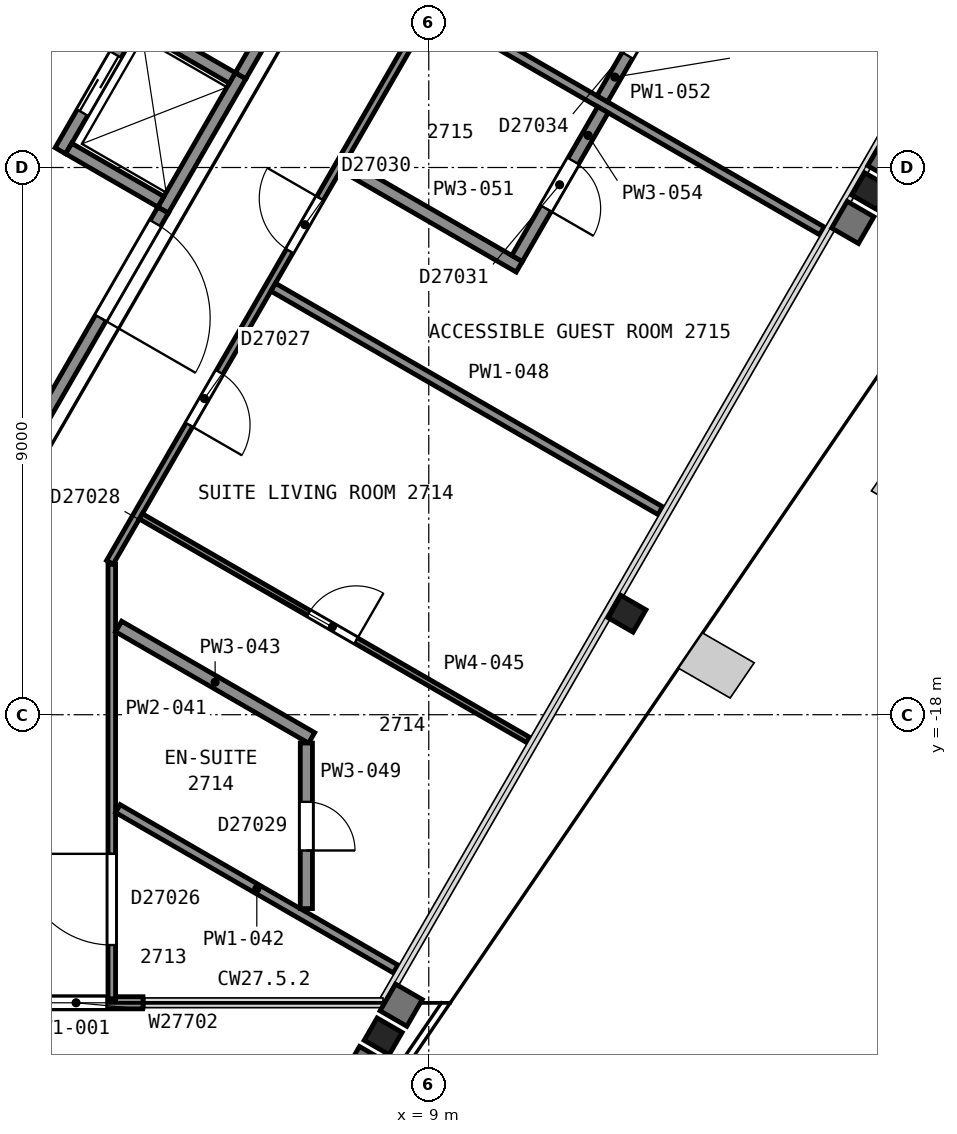
"""IFC4 building model, lengths in metres.
Left out: names, types, materials, properties, quantities, classifications, styles, units other than length and angle.
Written with IfcOpenShell. Run it as: python <this file> out.ifc"""

import sys

from ifc_helpers import new_model, si_unit, direction, frame, frame_2d, origin, origin_2d, place, context, subcontext, project, spatial, rectangle, i_section, extrude, element, fill, save


model = new_model("IFC4")
c1 = context("Model", 3, precision=1e-05, world=origin(), true_north=direction((0.0, 1.0)))
c2 = subcontext(c1, "Body", "Model", "MODEL_VIEW")
j1 = project(units=[si_unit("LENGTHUNIT", "METRE"), si_unit("PLANEANGLEUNIT", "RADIAN")], contexts=[c1])
p1 = place(None, origin())
s1 = spatial("IfcSite", under=j1, at=p1, CompositionType="ELEMENT")
p2 = place(p1, origin())
s2 = spatial("IfcBuilding", under=s1, at=p2, CompositionType="ELEMENT")
p3 = place(p2, frame((0.0, 0.0, 114.4)))
s3 = spatial("IfcBuildingStorey", under=s2, at=p3, CompositionType="ELEMENT", Elevation=114.4)
p4 = place(p3, frame((8.25, -23.29, 0.0), z_axis=(0.0, 0.0, 1.0), x_axis=(-0.5, -0.866025403784, 0.0)))
e1 = element("IfcColumn", 1, at=p4, inside=s3, PredefinedType="COLUMN", context=c2, shape_type="SweptSolid", body=[
    extrude(i_section(OverallWidth=0.424, OverallDepth=0.475, WebThickness=0.048, FlangeThickness=0.077, FilletRadius=0.015, at=origin_2d()), origin(), (0.0, 0.0, 1.0), 3.555),
])
p5 = place(p3, frame((12.26, -16.34, 0.0), z_axis=(0.0, 0.0, 1.0), x_axis=(-0.5, -0.866025403784, 0.0)))
e2 = element("IfcColumn", 2, at=p5, inside=s3, PredefinedType="COLUMN", context=c2, shape_type="SweptSolid", body=[
    extrude(i_section(OverallWidth=0.424, OverallDepth=0.475, WebThickness=0.048, FlangeThickness=0.077, FilletRadius=0.015, at=origin_2d()), origin(), (0.0, 0.0, 1.0), 3.56),
])
p6 = place(p3, frame((16.27, -9.39, 0.0), z_axis=(0.0, 0.0, 1.0), x_axis=(-0.5, -0.866025403784, 0.0)))
e3 = element("IfcColumn", 3, at=p6, inside=s3, PredefinedType="COLUMN", context=c2, shape_type="SweptSolid", body=[
    extrude(i_section(OverallWidth=0.424, OverallDepth=0.475, WebThickness=0.048, FlangeThickness=0.077, FilletRadius=0.015, at=origin_2d()), origin(), (0.0, 0.0, 1.0), 3.565),
])
p7 = place(p3, frame((-4.3, -22.738, 0.0), z_axis=(0.0, 0.0, 1.0), x_axis=(1.0, 0.0, 0.0)))
e4 = element("IfcWall", 4, at=p7, inside=s3, PredefinedType="SOLIDWALL", context=c2, shape_type="SweptSolid", body=[
    extrude(rectangle(XDim=8.6, YDim=0.2, at=frame_2d((4.3, 0.0))), origin(), (0.0, 0.0, 1.0), 2.613),
])
p8 = place(p7, frame((0.6, 0.0, 0.9)))
e5 = element("IfcOpeningElement", 5, at=p8, cuts=e4, PredefinedType="OPENING", context=c2, shape_type="SweptSolid", body=[
    extrude(rectangle(XDim=1.0, YDim=1.5, at=frame_2d((0.5, 0.75))), frame((0.0, 0.11, 0.0), z_axis=(0.0, -1.0, 0.0), x_axis=(1.0, 0.0, 0.0)), (0.0, 0.0, 1.0), 0.22),
])
p9 = place(p7, frame((2.2, 0.0, 0.0)))
e6 = element("IfcOpeningElement", 6, at=p9, cuts=e4, PredefinedType="OPENING", context=c2, shape_type="SweptSolid", body=[
    extrude(rectangle(XDim=1.8, YDim=2.4, at=frame_2d((0.9, 1.2))), frame((0.0, 0.11, 0.0), z_axis=(0.0, -1.0, 0.0), x_axis=(1.0, 0.0, 0.0)), (0.0, 0.0, 1.0), 0.22),
])
p10 = place(p7, frame((4.6, 0.0, 0.0)))
e7 = element("IfcOpeningElement", 7, at=p10, cuts=e4, PredefinedType="OPENING", context=c2, shape_type="SweptSolid", body=[
    extrude(rectangle(XDim=1.8, YDim=2.4, at=frame_2d((0.9, 1.2))), frame((0.0, 0.11, 0.0), z_axis=(0.0, -1.0, 0.0), x_axis=(1.0, 0.0, 0.0)), (0.0, 0.0, 1.0), 0.22),
])
p11 = place(p7, frame((7.0, 0.0, 0.9)))
e8 = element("IfcOpeningElement", 8, at=p11, cuts=e4, PredefinedType="OPENING", context=c2, shape_type="SweptSolid", body=[
    extrude(rectangle(XDim=1.0, YDim=1.5, at=frame_2d((0.5, 0.75))), frame((0.0, 0.11, 0.0), z_axis=(0.0, -1.0, 0.0), x_axis=(1.0, 0.0, 0.0)), (0.0, 0.0, 1.0), 0.22),
])
p12 = place(p3, frame((4.63, -9.7, 0.0), z_axis=(0.0, 0.0, 1.0), x_axis=(0.500062241894, 0.865989465428, 0.0)))
e9 = element("IfcWall", 9, at=p12, inside=s3, PredefinedType="PARTITIONING", context=c2, shape_type="SweptSolid", body=[
    extrude(rectangle(XDim=2.55, YDim=0.2, at=frame_2d((1.275, 0.0))), origin(), (0.0, 0.0, 1.0), 3.6),
])
p13 = place(p3, frame((2.942, -8.725, 0.0), z_axis=(0.0, 0.0, 1.0), x_axis=(0.500020783669, 0.866013403995, 0.0)))
e10 = element("IfcWall", 10, at=p13, inside=s3, PredefinedType="PARTITIONING", context=c2, shape_type="SweptSolid", body=[
    extrude(rectangle(XDim=2.55, YDim=0.2, at=frame_2d((1.275, 0.0))), origin(), (0.0, 0.0, 1.0), 3.6),
])
p14 = place(p13, frame((0.725, 0.0, 0.0)))
e11 = element("IfcOpeningElement", 11, at=p14, cuts=e10, PredefinedType="OPENING", context=c2, shape_type="SweptSolid", body=[
    extrude(rectangle(XDim=1.1, YDim=2.1, at=frame_2d((0.55, 1.05))), frame((0.0, 0.11, 0.0), z_axis=(0.0, -1.0, 0.0), x_axis=(1.0, 0.0, 0.0)), (0.0, 0.0, 1.0), 0.22),
])
p15 = place(p3, frame((5.769, -7.528, 0.0), z_axis=(0.0, 0.0, 1.0), x_axis=(-0.866002029911, 0.500040482552, 0.0)))
e12 = element("IfcWall", 12, at=p15, inside=s3, PredefinedType="PARTITIONING", context=c2, shape_type="SweptSolid", body=[
    extrude(rectangle(XDim=1.75, YDim=0.2, at=frame_2d((0.875, 0.0))), origin(), (0.0, 0.0, 1.0), 3.6),
])
p16 = place(p3, frame((4.594, -9.563, 0.0), z_axis=(0.0, 0.0, 1.0), x_axis=(-0.866036909293, 0.499980071345, 0.0)))
e13 = element("IfcWall", 13, at=p16, inside=s3, PredefinedType="PARTITIONING", context=c2, shape_type="SweptSolid", body=[
    extrude(rectangle(XDim=1.75, YDim=0.2, at=frame_2d((0.875, 0.0))), origin(), (0.0, 0.0, 1.0), 3.6),
])
p17 = place(p3, frame((1.677, -14.815, 0.0), z_axis=(0.0, 0.0, 1.0), x_axis=(0.49999445743, 0.866028603765, 0.0)))
e14 = element("IfcWall", 14, at=p17, inside=s3, PredefinedType="PARTITIONING", context=c2, shape_type="SweptSolid", body=[
    extrude(rectangle(XDim=5.905, YDim=0.2, at=frame_2d((2.952, 0.0))), origin(), (0.0, 0.0, 1.0), 3.35),
])
p18 = place(p17, frame((3.855, 0.0, 0.0)))
e15 = element("IfcOpeningElement", 15, at=p18, cuts=e14, PredefinedType="OPENING", context=c2, shape_type="SweptSolid", body=[
    extrude(rectangle(XDim=1.8, YDim=2.1, at=frame_2d((0.9, 1.05))), frame((0.0, 0.11, 0.0), z_axis=(0.0, -1.0, 0.0), x_axis=(1.0, 0.0, 0.0)), (0.0, 0.0, 1.0), 0.22),
])
p19 = place(p3, frame((5.906, -7.49, 0.0), z_axis=(0.0, 0.0, 1.0), x_axis=(0.500252727967, 0.865879442048, 0.0)))
e16 = element("IfcWall", 16, at=p19, inside=s3, PredefinedType="PARTITIONING", context=c2, shape_type="SweptSolid", body=[
    extrude(rectangle(XDim=2.617, YDim=0.2, at=frame_2d((1.309, 0.0))), origin(), (0.0, 0.0, 1.0), 3.35),
])
p20 = place(p3, frame((3.787, -15.525, 0.0), z_axis=(0.0, 0.0, 1.0), x_axis=(0.0, -1.0, 0.0)))
e17 = element("IfcWall", 17, at=p20, inside=s3, PredefinedType="PARTITIONING", context=c2, shape_type="SweptSolid", body=[
    extrude(rectangle(XDim=7.148, YDim=0.125, at=frame_2d((3.574, 0.0))), origin(), (0.0, 0.0, 1.0), 2.613),
])
p21 = place(p20, frame((4.763, 0.0, 0.0)))
e18 = element("IfcOpeningElement", 18, at=p21, cuts=e17, PredefinedType="OPENING", context=c2, shape_type="SweptSolid", body=[
    extrude(rectangle(XDim=1.5, YDim=2.1, at=frame_2d((0.75, 1.05))), frame((0.0, 0.073, 0.0), z_axis=(0.0, -1.0, 0.0), x_axis=(1.0, 0.0, 0.0)), (0.0, 0.0, 1.0), 0.145),
])
p22 = place(p3, frame((3.887, -19.544, 0.0), z_axis=(0.0, 0.0, 1.0), x_axis=(0.866042279195, -0.499970769793, 0.0)))
e19 = element("IfcWall", 19, at=p22, inside=s3, PredefinedType="PARTITIONING", context=c2, shape_type="SweptSolid", body=[
    extrude(rectangle(XDim=5.277, YDim=0.15, at=frame_2d((2.638, 0.0))), origin(), (0.0, 0.0, 1.0), 2.613),
])
p23 = place(p3, frame((3.899, -16.549, 0.0), z_axis=(0.0, 0.0, 1.0), x_axis=(0.866074669803, -0.499914659043, 0.0)))
e20 = element("IfcWall", 20, at=p23, inside=s3, PredefinedType="PARTITIONING", context=c2, shape_type="SweptSolid", body=[
    extrude(rectangle(XDim=3.665, YDim=0.2, at=frame_2d((1.833, 0.0))), origin(), (0.0, 0.0, 1.0), 2.613),
])
p24 = place(p3, frame((15.684, 5.165, 0.0), z_axis=(0.0, 0.0, 1.0), x_axis=(-0.500027787016, -0.866009360349, 0.0)))
e21 = element("IfcWall", 21, at=p24, inside=s3, PredefinedType="PARTITIONING", context=c2, shape_type="SweptSolid", body=[
    extrude(rectangle(XDim=23.856, YDim=0.125, at=frame_2d((11.928, 0.0))), origin(), (0.0, 0.0, 1.0), 2.613),
])
p25 = place(p24, frame((20.245, 0.0, 0.0)))
e22 = element("IfcOpeningElement", 22, at=p25, cuts=e21, PredefinedType="OPENING", context=c2, shape_type="SweptSolid", body=[
    extrude(rectangle(XDim=1.0, YDim=2.1, at=frame_2d((0.5, 1.05))), frame((0.0, 0.073, 0.0), z_axis=(0.0, -1.0, 0.0), x_axis=(1.0, 0.0, 0.0)), (0.0, 0.0, 1.0), 0.145),
])
p26 = place(p24, frame((16.943, 0.0, 0.0)))
e23 = element("IfcOpeningElement", 23, at=p26, cuts=e21, PredefinedType="OPENING", context=c2, shape_type="SweptSolid", body=[
    extrude(rectangle(XDim=1.0, YDim=2.1, at=frame_2d((0.5, 1.05))), frame((0.0, 0.073, 0.0), z_axis=(0.0, -1.0, 0.0), x_axis=(1.0, 0.0, 0.0)), (0.0, 0.0, 1.0), 0.145),
])
p27 = place(p24, frame((6.227, 0.0, 0.0)))
e24 = element("IfcOpeningElement", 24, at=p27, cuts=e21, PredefinedType="OPENING", context=c2, shape_type="SweptSolid", body=[
    extrude(rectangle(XDim=1.0, YDim=2.1, at=frame_2d((0.5, 1.05))), frame((0.0, 0.073, 0.0), z_axis=(0.0, -1.0, 0.0), x_axis=(1.0, 0.0, 0.0)), (0.0, 0.0, 1.0), 0.145),
])
p28 = place(p24, frame((2.825, 0.0, 0.0)))
e25 = element("IfcOpeningElement", 25, at=p28, cuts=e21, PredefinedType="OPENING", context=c2, shape_type="SweptSolid", body=[
    extrude(rectangle(XDim=0.9, YDim=2.1, at=frame_2d((0.45, 1.05))), frame((0.0, 0.073, 0.0), z_axis=(0.0, -1.0, 0.0), x_axis=(1.0, 0.0, 0.0)), (0.0, 0.0, 1.0), 0.145),
])
p29 = place(p3, frame((10.633, -18.413, 0.0), z_axis=(0.0, 0.0, 1.0), x_axis=(-0.8660606245, 0.499938990969, 0.0)))
e26 = element("IfcWall", 26, at=p29, inside=s3, PredefinedType="PARTITIONING", context=c2, shape_type="SweptSolid", body=[
    extrude(rectangle(XDim=7.353, YDim=0.1, at=frame_2d((3.676, 0.0))), origin(), (0.0, 0.0, 1.0), 2.613),
])
p30 = place(p29, frame((3.265, 0.0, 0.0)))
e27 = element("IfcOpeningElement", 27, at=p30, cuts=e26, PredefinedType="OPENING", context=c2, shape_type="SweptSolid", body=[
    extrude(rectangle(XDim=0.9, YDim=2.1, at=frame_2d((0.45, 1.05))), frame((0.0, 0.06, 0.0), z_axis=(0.0, -1.0, 0.0), x_axis=(1.0, 0.0, 0.0)), (0.0, 0.0, 1.0), 0.12),
])
p31 = place(p3, frame((6.441, -10.968, 0.0), z_axis=(0.0, 0.0, 1.0), x_axis=(0.8660606245, -0.499938990969, 0.0)))
e28 = element("IfcWall", 28, at=p31, inside=s3, PredefinedType="PARTITIONING", context=c2, shape_type="SweptSolid", body=[
    extrude(rectangle(XDim=7.353, YDim=0.15, at=frame_2d((3.676, 0.0))), origin(), (0.0, 0.0, 1.0), 2.613),
])
p32 = place(p3, frame((6.987, -21.189, 0.0), z_axis=(0.0, 0.0, 1.0), x_axis=(0.0, 1.0, 0.0)))
e29 = element("IfcWall", 29, at=p32, inside=s3, PredefinedType="PARTITIONING", context=c2, shape_type="SweptSolid", body=[
    extrude(rectangle(XDim=2.723, YDim=0.2, at=frame_2d((1.361, 0.0))), origin(), (0.0, 0.0, 1.0), 2.613),
])
p33 = place(p32, frame((0.956, 0.0, 0.0)))
e30 = element("IfcOpeningElement", 30, at=p33, cuts=e29, PredefinedType="OPENING", context=c2, shape_type="SweptSolid", body=[
    extrude(rectangle(XDim=0.8, YDim=2.1, at=frame_2d((0.4, 1.05))), frame((0.0, 0.11, 0.0), z_axis=(0.0, -1.0, 0.0), x_axis=(1.0, 0.0, 0.0)), (0.0, 0.0, 1.0), 0.22),
])
p34 = place(p3, frame((7.603, -8.967, 0.0), z_axis=(0.0, 0.0, 1.0), x_axis=(0.866020884234, -0.500007828009, 0.0)))
e31 = element("IfcWall", 31, at=p34, inside=s3, PredefinedType="PARTITIONING", context=c2, shape_type="SweptSolid", body=[
    extrude(rectangle(XDim=3.333, YDim=0.2, at=frame_2d((1.666, 0.0))), origin(), (0.0, 0.0, 1.0), 2.613),
])
p35 = place(p3, frame((9.103, -6.369, 0.0), z_axis=(0.0, 0.0, 1.0), x_axis=(0.866055004685, -0.499948726231, 0.0)))
e32 = element("IfcWall", 32, at=p35, inside=s3, PredefinedType="PARTITIONING", context=c2, shape_type="SweptSolid", body=[
    extrude(rectangle(XDim=7.347, YDim=0.15, at=frame_2d((3.674, 0.0))), origin(), (0.0, 0.0, 1.0), 2.613),
])
p36 = place(p3, frame((10.452, -10.496, 0.0), z_axis=(0.0, 0.0, 1.0), x_axis=(0.500061596976, 0.865989837833, 0.0)))
e33 = element("IfcWall", 33, at=p36, inside=s3, PredefinedType="PARTITIONING", context=c2, shape_type="SweptSolid", body=[
    extrude(rectangle(XDim=2.825, YDim=0.2, at=frame_2d((1.413, 0.0))), origin(), (0.0, 0.0, 1.0), 2.613),
])
p37 = place(p36, frame((0.95, 0.0, 0.0)))
e34 = element("IfcOpeningElement", 34, at=p37, cuts=e33, PredefinedType="OPENING", context=c2, shape_type="SweptSolid", body=[
    extrude(rectangle(XDim=0.9, YDim=2.1, at=frame_2d((0.45, 1.05))), frame((0.0, 0.11, 0.0), z_axis=(0.0, -1.0, 0.0), x_axis=(1.0, 0.0, 0.0)), (0.0, 0.0, 1.0), 0.22),
])
p38 = place(p3, frame((11.854, -7.87, 0.0), z_axis=(0.0, 0.0, 1.0), x_axis=(0.499885111907, 0.866091724296, 0.0)))
e35 = element("IfcWall", 35, at=p38, inside=s3, PredefinedType="PARTITIONING", context=c2, shape_type="SweptSolid", body=[
    extrude(rectangle(XDim=2.425, YDim=0.2, at=frame_2d((1.213, 0.0))), origin(), (0.0, 0.0, 1.0), 2.613),
])
p39 = place(p38, frame((0.825, 0.0, 0.0)))
e36 = element("IfcOpeningElement", 36, at=p39, cuts=e35, PredefinedType="OPENING", context=c2, shape_type="SweptSolid", body=[
    extrude(rectangle(XDim=0.8, YDim=2.1, at=frame_2d((0.4, 1.05))), frame((0.0, 0.11, 0.0), z_axis=(0.0, -1.0, 0.0), x_axis=(1.0, 0.0, 0.0)), (0.0, 0.0, 1.0), 0.22),
])
p40 = place(p11, origin())
e37 = element("IfcWindow", 37, at=p40, inside=s3, PartitioningType="SINGLE_PANEL", PredefinedType="WINDOW", context=c2, shape_type="SweptSolid", body=[
    extrude(rectangle(XDim=1.0, YDim=1.5, at=frame_2d((0.5, 0.75))), frame((0.0, 0.03, 0.0), z_axis=(0.0, -1.0, 0.0), x_axis=(1.0, 0.0, 0.0)), (0.0, 0.0, 1.0), 0.06),
])
fill(e8, e37)
p41 = place(p14, origin())
e38 = element("IfcDoor", 38, at=p41, inside=s3, OperationType="SLIDING_TO_RIGHT", PredefinedType="DOOR", context=c2, shape_type="SweptSolid", body=[
    extrude(rectangle(XDim=1.1, YDim=2.1, at=frame_2d((0.55, 1.05))), frame((0.0, 0.025, 0.0), z_axis=(0.0, -1.0, 0.0), x_axis=(1.0, 0.0, 0.0)), (0.0, 0.0, 1.0), 0.05),
])
fill(e11, e38)
p42 = place(p18, origin())
e39 = element("IfcDoor", 39, at=p42, inside=s3, OperationType="DOUBLE_DOOR_SINGLE_SWING", PredefinedType="DOOR", context=c2, shape_type="SweptSolid", body=[
    extrude(rectangle(XDim=1.8, YDim=2.1, at=frame_2d((0.9, 1.05))), frame((0.0, 0.025, 0.0), z_axis=(0.0, -1.0, 0.0), x_axis=(1.0, 0.0, 0.0)), (0.0, 0.0, 1.0), 0.05),
])
fill(e15, e39)
p43 = place(p21, origin())
e40 = element("IfcDoor", 40, at=p43, inside=s3, OperationType="DOUBLE_DOOR_SINGLE_SWING", PredefinedType="DOOR", context=c2, shape_type="SweptSolid", body=[
    extrude(rectangle(XDim=1.5, YDim=2.1, at=frame_2d((0.75, 1.05))), frame((0.0, 0.025, 0.0), z_axis=(0.0, -1.0, 0.0), x_axis=(1.0, 0.0, 0.0)), (0.0, 0.0, 1.0), 0.05),
])
fill(e18, e40)
p44 = place(p25, origin())
e41 = element("IfcDoor", 41, at=p44, inside=s3, OperationType="SINGLE_SWING_RIGHT", PredefinedType="DOOR", context=c2, shape_type="SweptSolid", body=[
    extrude(rectangle(XDim=1.0, YDim=2.1, at=frame_2d((0.5, 1.05))), frame((0.0, 0.025, 0.0), z_axis=(0.0, -1.0, 0.0), x_axis=(1.0, 0.0, 0.0)), (0.0, 0.0, 1.0), 0.05),
])
fill(e22, e41)
p45 = place(p26, origin())
e42 = element("IfcDoor", 42, at=p45, inside=s3, OperationType="SINGLE_SWING_LEFT", PredefinedType="DOOR", context=c2, shape_type="SweptSolid", body=[
    extrude(rectangle(XDim=1.0, YDim=2.1, at=frame_2d((0.5, 1.05))), frame((0.0, 0.025, 0.0), z_axis=(0.0, -1.0, 0.0), x_axis=(1.0, 0.0, 0.0)), (0.0, 0.0, 1.0), 0.05),
])
fill(e23, e42)
p46 = place(p30, origin())
e43 = element("IfcDoor", 43, at=p46, inside=s3, OperationType="SINGLE_SWING_LEFT", PredefinedType="DOOR", context=c2, shape_type="SweptSolid", body=[
    extrude(rectangle(XDim=0.9, YDim=2.1, at=frame_2d((0.45, 1.05))), frame((0.0, 0.025, 0.0), z_axis=(0.0, -1.0, 0.0), x_axis=(1.0, 0.0, 0.0)), (0.0, 0.0, 1.0), 0.05),
])
fill(e27, e43)
p47 = place(p33, origin())
e44 = element("IfcDoor", 44, at=p47, inside=s3, OperationType="SINGLE_SWING_LEFT", PredefinedType="DOOR", context=c2, shape_type="SweptSolid", body=[
    extrude(rectangle(XDim=0.8, YDim=2.1, at=frame_2d((0.4, 1.05))), frame((0.0, 0.025, 0.0), z_axis=(0.0, -1.0, 0.0), x_axis=(1.0, 0.0, 0.0)), (0.0, 0.0, 1.0), 0.05),
])
fill(e30, e44)
p48 = place(p37, origin())
e45 = element("IfcDoor", 45, at=p48, inside=s3, OperationType="SINGLE_SWING_LEFT", PredefinedType="DOOR", context=c2, shape_type="SweptSolid", body=[
    extrude(rectangle(XDim=0.9, YDim=2.1, at=frame_2d((0.45, 1.05))), frame((0.0, 0.025, 0.0), z_axis=(0.0, -1.0, 0.0), x_axis=(1.0, 0.0, 0.0)), (0.0, 0.0, 1.0), 0.05),
])
fill(e34, e45)
p49 = place(p39, origin())
e46 = element("IfcDoor", 46, at=p49, inside=s3, OperationType="SINGLE_SWING_RIGHT", PredefinedType="DOOR", context=c2, shape_type="SweptSolid", body=[
    extrude(rectangle(XDim=0.8, YDim=2.1, at=frame_2d((0.4, 1.05))), frame((0.0, 0.025, 0.0), z_axis=(0.0, -1.0, 0.0), x_axis=(1.0, 0.0, 0.0)), (0.0, 0.0, 1.0), 0.05),
])
fill(e36, e46)
save(model, sys.argv[1])
